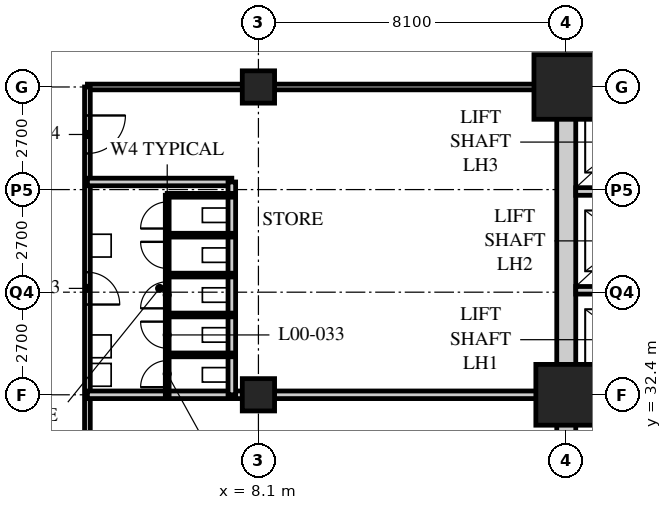
"""IFC4 building model, lengths in metres.
Left out: names, types, materials, properties, quantities, classifications, styles, units other than length and angle.
Written with IfcOpenShell. Run it as: python <this file> out.ifc"""

import sys

from ifc_helpers import new_model, si_unit, direction, frame, frame_2d, origin, origin_2d, place, context, subcontext, project, spatial, rectangle, hollow_rectangle, extrude, element, fill, save


model = new_model("IFC4")
c1 = context("Model", 3, precision=1e-05, world=origin(), true_north=direction((0.0, 1.0)))
c2 = subcontext(c1, "Body", "Model", "MODEL_VIEW")
j1 = project(units=[si_unit("LENGTHUNIT", "METRE"), si_unit("PLANEANGLEUNIT", "RADIAN")], contexts=[c1])
p1 = place(None, origin())
s1 = spatial("IfcSite", under=j1, at=p1, CompositionType="ELEMENT")
p2 = place(p1, origin())
s2 = spatial("IfcBuilding", under=s1, at=p2, CompositionType="ELEMENT")
p3 = place(p2, origin())
s3 = spatial("IfcBuildingStorey", under=s2, at=p3, CompositionType="ELEMENT", Elevation=0.0)
for number, where, z_axis, x_axis in (
    (1, (8.1, 32.4, 0.0), (0.0, 0.0, 1.0), (1.0, 0.0, 0.0)),
    (2, (8.1, 40.5, 0.0), (0.0, 0.0, 1.0), (1.0, 0.0, 0.0)),
):
    element("IfcColumn", number, at=place(p3, frame(where, z_axis=z_axis, x_axis=x_axis)), inside=s3, PredefinedType="COLUMN", context=c2, shape_type="SweptSolid", body=[
        extrude(hollow_rectangle(XDim=0.85, YDim=0.85, WallThickness=0.085, at=origin_2d()), origin(), (0.0, 0.0, 1.0), 6.0),
    ])
p4 = place(p3, frame((16.2, 32.4, 0.0), z_axis=(0.0, 0.0, 1.0), x_axis=(1.0, 0.0, 0.0)))
e3 = element("IfcColumn", 3, at=p4, inside=s3, PredefinedType="COLUMN", context=c2, shape_type="SweptSolid", body=[
    extrude(hollow_rectangle(XDim=1.6, YDim=1.6, WallThickness=0.15, at=origin_2d()), origin(), (0.0, 0.0, 1.0), 6.0),
])
p5 = place(p3, frame((16.2, 40.5, 0.0), z_axis=(0.0, 0.0, 1.0), x_axis=(1.0, 0.0, 0.0)))
e4 = element("IfcColumn", 4, at=p5, inside=s3, PredefinedType="COLUMN", context=c2, shape_type="SweptSolid", body=[
    extrude(hollow_rectangle(XDim=1.7, YDim=1.7, WallThickness=0.16, at=origin_2d()), origin(), (0.0, 0.0, 1.0), 6.0),
])
p6 = place(p3, frame((16.0, 40.5, 0.0), z_axis=(0.0, 0.0, 1.0), x_axis=(-1.0, 0.0, 0.0)))
e5 = element("IfcWall", 5, at=p6, inside=s3, PredefinedType="PARTITIONING", context=c2, shape_type="SweptSolid", body=[
    extrude(rectangle(XDim=12.4, YDim=0.15, at=frame_2d((6.2, 0.0))), origin(), (0.0, 0.0, 1.0), 5.138),
])
p7 = place(p3, frame((3.6, 40.5, 0.0), z_axis=(0.0, 0.0, 1.0), x_axis=(0.0, -1.0, 0.0)))
e6 = element("IfcWall", 6, at=p7, inside=s3, PredefinedType="PARTITIONING", context=c2, shape_type="SweptSolid", body=[
    extrude(rectangle(XDim=36.9, YDim=0.15, at=frame_2d((18.45, 0.0))), origin(), (0.0, 0.0, 1.0), 5.75),
])
p8 = place(p7, frame((13.375, 0.0, 0.0)))
e7 = element("IfcOpeningElement", 7, at=p8, cuts=e6, PredefinedType="OPENING", context=c2, shape_type="SweptSolid", body=[
    extrude(rectangle(XDim=0.85, YDim=2.1, at=frame_2d((0.425, 1.05))), frame((0.0, 0.085, 0.0), z_axis=(0.0, -1.0, 0.0), x_axis=(1.0, 0.0, 0.0)), (0.0, 0.0, 1.0), 0.17),
])
p9 = place(p7, frame((9.25, 0.0, 0.0)))
e8 = element("IfcOpeningElement", 8, at=p9, cuts=e6, PredefinedType="OPENING", context=c2, shape_type="SweptSolid", body=[
    extrude(rectangle(XDim=1.0, YDim=2.1, at=frame_2d((0.5, 1.05))), frame((0.0, 0.085, 0.0), z_axis=(0.0, -1.0, 0.0), x_axis=(1.0, 0.0, 0.0)), (0.0, 0.0, 1.0), 0.17),
])
p10 = place(p7, frame((4.875, 0.0, 0.0)))
e9 = element("IfcOpeningElement", 9, at=p10, cuts=e6, PredefinedType="OPENING", context=c2, shape_type="SweptSolid", body=[
    extrude(rectangle(XDim=0.85, YDim=2.1, at=frame_2d((0.425, 1.05))), frame((0.0, 0.085, 0.0), z_axis=(0.0, -1.0, 0.0), x_axis=(1.0, 0.0, 0.0)), (0.0, 0.0, 1.0), 0.17),
])
p11 = place(p7, frame((0.75, 0.0, 0.0)))
e10 = element("IfcOpeningElement", 10, at=p11, cuts=e6, PredefinedType="OPENING", context=c2, shape_type="SweptSolid", body=[
    extrude(rectangle(XDim=1.0, YDim=2.1, at=frame_2d((0.5, 1.05))), frame((0.0, 0.085, 0.0), z_axis=(0.0, -1.0, 0.0), x_axis=(1.0, 0.0, 0.0)), (0.0, 0.0, 1.0), 0.17),
])
p12 = place(p3, frame((3.6, 32.4, 0.0), z_axis=(0.0, 0.0, 1.0), x_axis=(1.0, 0.0, 0.0)))
e11 = element("IfcWall", 11, at=p12, inside=s3, PredefinedType="SOLIDWALL", context=c2, shape_type="SweptSolid", body=[
    extrude(rectangle(XDim=12.6, YDim=0.2, at=frame_2d((6.3, 0.0))), origin(), (0.0, 0.0, 1.0), 5.138),
])
p13 = place(p3, frame((3.6, 38.0, 0.0), z_axis=(0.0, 0.0, 1.0), x_axis=(1.0, 0.0, 0.0)))
e12 = element("IfcWall", 12, at=p13, inside=s3, PredefinedType="SOLIDWALL", context=c2, shape_type="SweptSolid", body=[
    extrude(rectangle(XDim=3.8, YDim=0.2, at=frame_2d((1.9, 0.0))), origin(), (0.0, 0.0, 1.0), 5.75),
])
p14 = place(p3, frame((7.4, 32.4, 0.0), z_axis=(0.0, 0.0, 1.0), x_axis=(0.0, 1.0, 0.0)))
e13 = element("IfcWall", 13, at=p14, inside=s3, PredefinedType="SOLIDWALL", context=c2, shape_type="SweptSolid", body=[
    extrude(rectangle(XDim=5.6, YDim=0.2, at=frame_2d((2.8, 0.0))), origin(), (0.0, 0.0, 1.0), 5.75),
])
p15 = place(p3, frame((5.7, 32.4, 0.0), z_axis=(0.0, 0.0, 1.0), x_axis=(0.0, 1.0, 0.0)))
e14 = element("IfcWall", 14, at=p15, inside=s3, PredefinedType="PARTITIONING", context=c2, shape_type="SweptSolid", body=[
    extrude(rectangle(XDim=5.25, YDim=0.1, at=frame_2d((2.625, 0.0))), origin(), (0.0, 0.0, 1.0), 5.75),
])
p16 = place(p15, frame((0.2, 0.0, 0.0)))
e15 = element("IfcOpeningElement", 15, at=p16, cuts=e14, PredefinedType="OPENING", context=c2, shape_type="SweptSolid", body=[
    extrude(rectangle(XDim=0.7, YDim=2.0, at=frame_2d((0.35, 1.0))), frame((0.0, 0.06, 0.0), z_axis=(0.0, -1.0, 0.0), x_axis=(1.0, 0.0, 0.0)), (0.0, 0.0, 1.0), 0.12),
])
p17 = place(p15, frame((1.225, 0.0, 0.0)))
e16 = element("IfcOpeningElement", 16, at=p17, cuts=e14, PredefinedType="OPENING", context=c2, shape_type="SweptSolid", body=[
    extrude(rectangle(XDim=0.7, YDim=2.0, at=frame_2d((0.35, 1.0))), frame((0.0, 0.06, 0.0), z_axis=(0.0, -1.0, 0.0), x_axis=(1.0, 0.0, 0.0)), (0.0, 0.0, 1.0), 0.12),
])
p18 = place(p15, frame((2.275, 0.0, 0.0)))
e17 = element("IfcOpeningElement", 17, at=p18, cuts=e14, PredefinedType="OPENING", context=c2, shape_type="SweptSolid", body=[
    extrude(rectangle(XDim=0.7, YDim=2.0, at=frame_2d((0.35, 1.0))), frame((0.0, 0.06, 0.0), z_axis=(0.0, -1.0, 0.0), x_axis=(1.0, 0.0, 0.0)), (0.0, 0.0, 1.0), 0.12),
])
p19 = place(p15, frame((3.325, 0.0, 0.0)))
e18 = element("IfcOpeningElement", 18, at=p19, cuts=e14, PredefinedType="OPENING", context=c2, shape_type="SweptSolid", body=[
    extrude(rectangle(XDim=0.7, YDim=2.0, at=frame_2d((0.35, 1.0))), frame((0.0, 0.06, 0.0), z_axis=(0.0, -1.0, 0.0), x_axis=(1.0, 0.0, 0.0)), (0.0, 0.0, 1.0), 0.12),
])
p20 = place(p15, frame((4.375, 0.0, 0.0)))
e19 = element("IfcOpeningElement", 19, at=p20, cuts=e14, PredefinedType="OPENING", context=c2, shape_type="SweptSolid", body=[
    extrude(rectangle(XDim=0.7, YDim=2.0, at=frame_2d((0.35, 1.0))), frame((0.0, 0.06, 0.0), z_axis=(0.0, -1.0, 0.0), x_axis=(1.0, 0.0, 0.0)), (0.0, 0.0, 1.0), 0.12),
])
for number, where, z_axis, x_axis in (
    (20, (5.7, 33.45, 0.0), (0.0, 0.0, 1.0), (1.0, 0.0, 0.0)),
    (21, (5.7, 34.5, 0.0), (0.0, 0.0, 1.0), (1.0, 0.0, 0.0)),
    (22, (5.7, 35.55, 0.0), (0.0, 0.0, 1.0), (1.0, 0.0, 0.0)),
    (23, (5.7, 36.6, 0.0), (0.0, 0.0, 1.0), (1.0, 0.0, 0.0)),
    (24, (5.7, 37.65, 0.0), (0.0, 0.0, 1.0), (1.0, 0.0, 0.0)),
):
    element("IfcWall", number, at=place(p3, frame(where, z_axis=z_axis, x_axis=x_axis)), inside=s3, PredefinedType="PARTITIONING", context=c2, shape_type="SweptSolid", body=[
        extrude(rectangle(XDim=1.7, YDim=0.1, at=frame_2d((0.85, 0.0))), origin(), (0.0, 0.0, 1.0), 5.75),
    ])
p21 = place(p3, frame((15.95, 40.5, 0.0), z_axis=(0.0, 0.0, 1.0), x_axis=(1.0, 0.0, 0.0)))
e25 = element("IfcWall", 25, at=p21, inside=s3, PredefinedType="SOLIDWALL", context=c2, shape_type="SweptSolid", body=[
    extrude(rectangle(XDim=24.8, YDim=0.5, at=frame_2d((12.4, 0.0))), origin(), (0.0, 0.0, 1.0), 5.1),
])
p22 = place(p21, frame((11.5, 0.0, 0.0)))
e26 = element("IfcOpeningElement", 26, at=p22, cuts=e25, PredefinedType="OPENING", context=c2, shape_type="SweptSolid", body=[
    extrude(rectangle(XDim=1.8, YDim=2.4, at=frame_2d((0.9, 1.2))), frame((0.0, 0.26, 0.0), z_axis=(0.0, -1.0, 0.0), x_axis=(1.0, 0.0, 0.0)), (0.0, 0.0, 1.0), 0.52),
])
p23 = place(p3, frame((16.2, 24.55, 0.0), z_axis=(0.0, 0.0, 1.0), x_axis=(0.0, 1.0, 0.0)))
e27 = element("IfcWall", 27, at=p23, inside=s3, PredefinedType="SOLIDWALL", context=c2, shape_type="SweptSolid", body=[
    extrude(rectangle(XDim=15.7, YDim=0.5, at=frame_2d((7.85, 0.0))), origin(), (0.0, 0.0, 1.0), 5.138),
])
p24 = place(p3, frame((16.45, 32.4, 0.0), z_axis=(0.0, 0.0, 1.0), x_axis=(1.0, 0.0, 0.0)))
e28 = element("IfcWall", 28, at=p24, inside=s3, PredefinedType="SOLIDWALL", context=c2, shape_type="SweptSolid", body=[
    extrude(rectangle(XDim=7.95, YDim=0.2, at=frame_2d((3.975, 0.0))), origin(), (0.0, 0.0, 1.0), 5.05),
])
for number, where, z_axis, x_axis in (
    (29, (16.45, 35.15, 0.0), (0.0, 0.0, 1.0), (1.0, 0.0, 0.0)),
    (30, (16.45, 37.75, 0.0), (0.0, 0.0, 1.0), (1.0, 0.0, 0.0)),
):
    element("IfcWall", number, at=place(p3, frame(where, z_axis=z_axis, x_axis=x_axis)), inside=s3, PredefinedType="SOLIDWALL", context=c2, shape_type="SweptSolid", body=[
        extrude(rectangle(XDim=2.6, YDim=0.2, at=frame_2d((1.3, 0.0))), origin(), (0.0, 0.0, 1.0), 5.75),
    ])
p25 = place(p10, origin())
e31 = element("IfcDoor", 31, at=p25, inside=s3, OperationType="SINGLE_SWING_RIGHT", PredefinedType="DOOR", context=c2, shape_type="SweptSolid", body=[
    extrude(rectangle(XDim=0.85, YDim=2.1, at=frame_2d((0.425, 1.05))), frame((0.0, 0.025, 0.0), z_axis=(0.0, -1.0, 0.0), x_axis=(1.0, 0.0, 0.0)), (0.0, 0.0, 1.0), 0.05),
])
fill(e9, e31)
p26 = place(p11, origin())
e32 = element("IfcDoor", 32, at=p26, inside=s3, OperationType="SINGLE_SWING_LEFT", PredefinedType="DOOR", context=c2, shape_type="SweptSolid", body=[
    extrude(rectangle(XDim=1.0, YDim=2.1, at=frame_2d((0.5, 1.05))), frame((0.0, 0.025, 0.0), z_axis=(0.0, -1.0, 0.0), x_axis=(1.0, 0.0, 0.0)), (0.0, 0.0, 1.0), 0.05),
])
fill(e10, e32)
p27 = place(p16, origin())
e33 = element("IfcDoor", 33, at=p27, inside=s3, OperationType="SINGLE_SWING_LEFT", PredefinedType="DOOR", context=c2, shape_type="SweptSolid", body=[
    extrude(rectangle(XDim=0.7, YDim=2.0, at=frame_2d((0.35, 1.0))), frame((0.0, 0.025, 0.0), z_axis=(0.0, -1.0, 0.0), x_axis=(1.0, 0.0, 0.0)), (0.0, 0.0, 1.0), 0.05),
])
fill(e15, e33)
p28 = place(p17, origin())
e34 = element("IfcDoor", 34, at=p28, inside=s3, OperationType="SINGLE_SWING_RIGHT", PredefinedType="DOOR", context=c2, shape_type="SweptSolid", body=[
    extrude(rectangle(XDim=0.7, YDim=2.0, at=frame_2d((0.35, 1.0))), frame((0.0, 0.025, 0.0), z_axis=(0.0, -1.0, 0.0), x_axis=(1.0, 0.0, 0.0)), (0.0, 0.0, 1.0), 0.05),
])
fill(e16, e34)
p29 = place(p18, origin())
e35 = element("IfcDoor", 35, at=p29, inside=s3, OperationType="SINGLE_SWING_LEFT", PredefinedType="DOOR", context=c2, shape_type="SweptSolid", body=[
    extrude(rectangle(XDim=0.7, YDim=2.0, at=frame_2d((0.35, 1.0))), frame((0.0, 0.025, 0.0), z_axis=(0.0, -1.0, 0.0), x_axis=(1.0, 0.0, 0.0)), (0.0, 0.0, 1.0), 0.05),
])
fill(e17, e35)
p30 = place(p19, origin())
e36 = element("IfcDoor", 36, at=p30, inside=s3, OperationType="SINGLE_SWING_RIGHT", PredefinedType="DOOR", context=c2, shape_type="SweptSolid", body=[
    extrude(rectangle(XDim=0.7, YDim=2.0, at=frame_2d((0.35, 1.0))), frame((0.0, 0.025, 0.0), z_axis=(0.0, -1.0, 0.0), x_axis=(1.0, 0.0, 0.0)), (0.0, 0.0, 1.0), 0.05),
])
fill(e18, e36)
p31 = place(p20, origin())
e37 = element("IfcDoor", 37, at=p31, inside=s3, OperationType="SINGLE_SWING_LEFT", PredefinedType="DOOR", context=c2, shape_type="SweptSolid", body=[
    extrude(rectangle(XDim=0.7, YDim=2.0, at=frame_2d((0.35, 1.0))), frame((0.0, 0.025, 0.0), z_axis=(0.0, -1.0, 0.0), x_axis=(1.0, 0.0, 0.0)), (0.0, 0.0, 1.0), 0.05),
])
fill(e19, e37)
save(model, sys.argv[1])
